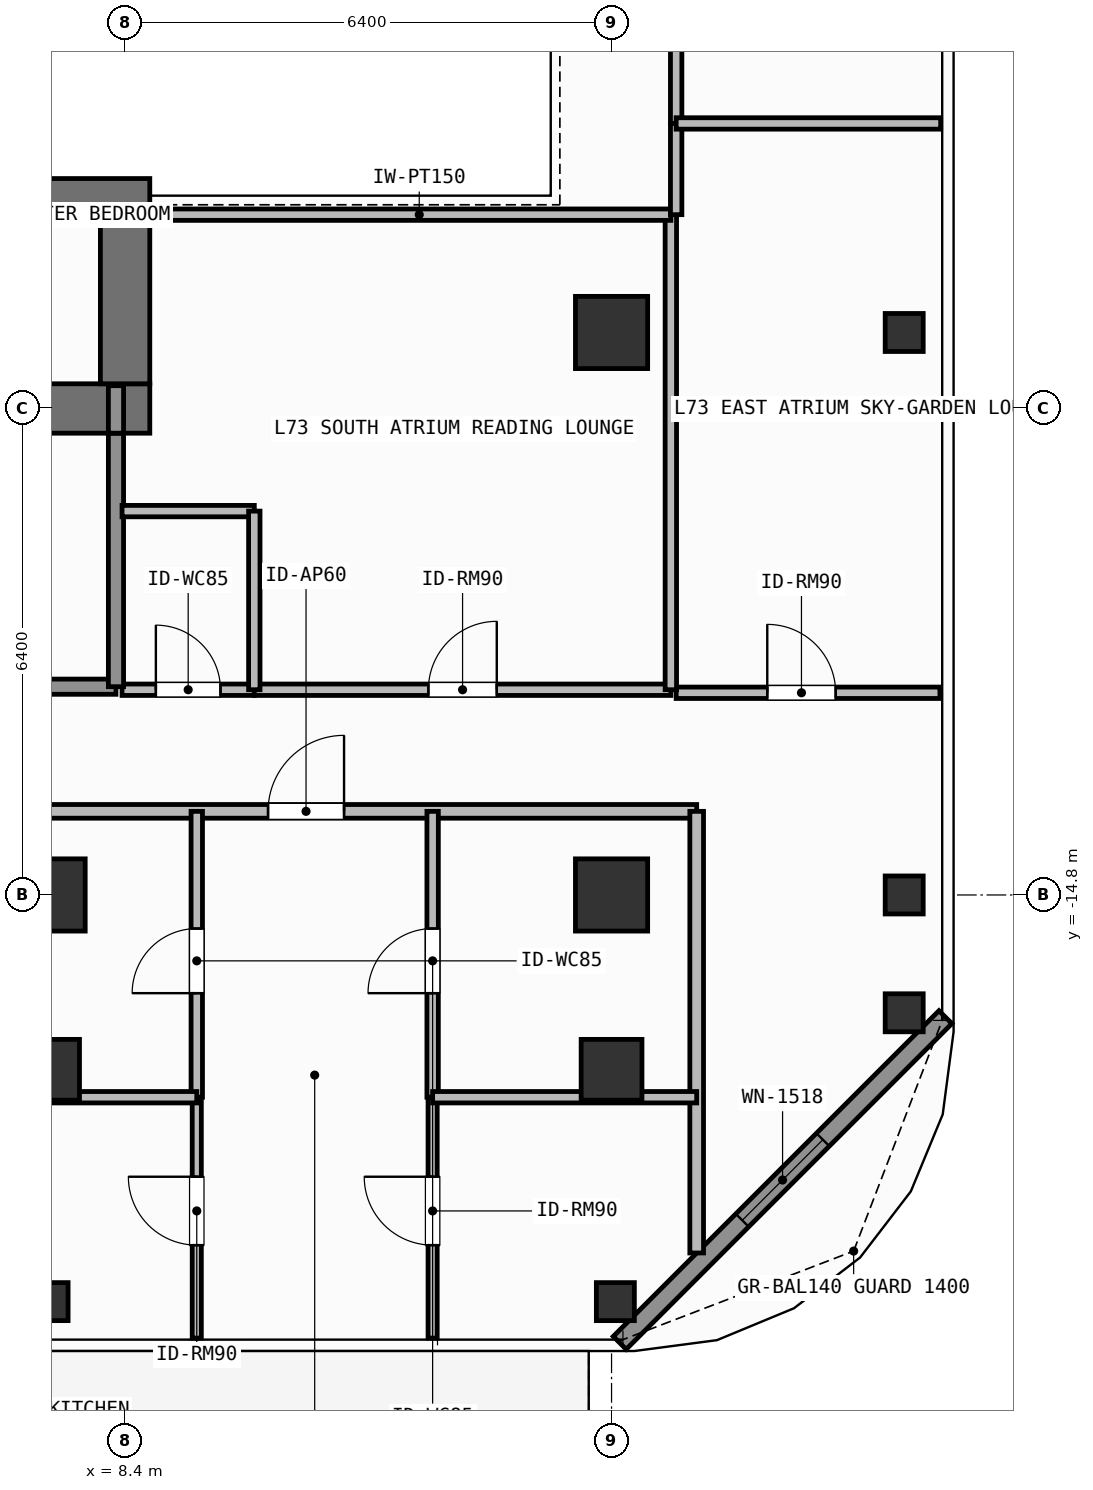
"""IFC4 building model, lengths in metres.
Left out: names, types, materials, properties, quantities, classifications, styles, units other than length and angle.
Written with IfcOpenShell. Run it as: python <this file> out.ifc"""

import sys

from ifc_helpers import new_model, si_unit, direction, frame, frame_2d, origin, origin_2d, place, context, subcontext, project, spatial, rectangle, hollow_rectangle, extrude, element, fill, save


model = new_model("IFC4")
c1 = context("Model", 3, precision=1e-05, world=origin(), true_north=direction((0.0, 1.0)))
c2 = subcontext(c1, "Body", "Model", "MODEL_VIEW")
j1 = project(units=[si_unit("LENGTHUNIT", "METRE"), si_unit("PLANEANGLEUNIT", "RADIAN")], contexts=[c1])
p1 = place(None, origin())
s1 = spatial("IfcSite", under=j1, at=p1, CompositionType="ELEMENT")
p2 = place(p1, origin())
s2 = spatial("IfcBuilding", under=s1, at=p2, CompositionType="ELEMENT")
p3 = place(p2, frame((0.0, 0.0, 297.6)))
s3 = spatial("IfcBuildingStorey", under=s2, at=p3, CompositionType="ELEMENT", Elevation=297.6)
p4 = place(p3, frame((6.12, -8.4, 0.0), z_axis=(0.0, 0.0, 1.0), x_axis=(1.0, 0.0, 0.0)))
e1 = element("IfcWall", 1, at=p4, inside=s3, PredefinedType="SHEAR", context=c2, shape_type="SweptSolid", body=[
    extrude(rectangle(XDim=2.605, YDim=0.65, at=frame_2d((1.302, 0.0))), origin(), (0.0, 0.0, 1.0), 3.9),
])
p5 = place(p3, frame((8.4, -8.075, 0.0), z_axis=(0.0, 0.0, 1.0), x_axis=(0.0, 1.0, 0.0)))
e2 = element("IfcWall", 2, at=p5, inside=s3, PredefinedType="SHEAR", context=c2, shape_type="SweptSolid", body=[
    extrude(rectangle(XDim=2.25, YDim=0.65, at=frame_2d((1.125, 0.0))), origin(), (0.0, 0.0, 1.0), 3.9),
])
p6 = place(p3, frame((3.045, -5.6, 0.0), z_axis=(0.0, 0.0, 1.0), x_axis=(1.0, 0.0, 0.0)))
e3 = element("IfcWall", 3, at=p6, inside=s3, PredefinedType="SHEAR", context=c2, shape_type="SweptSolid", body=[
    extrude(rectangle(XDim=5.68, YDim=0.45, at=frame_2d((2.84, 0.0))), origin(), (0.0, 0.0, 1.0), 3.9),
])
for number, where, z_axis, x_axis in (
    (4, (7.4, -14.8, 0.0), (0.0, 0.0, 1.0), (1.0, 0.0, 0.0)),
    (5, (14.8, -14.8, 0.0), (0.0, 0.0, 1.0), (1.0, 0.0, 0.0)),
    (6, (14.8, -7.4, 0.0), (0.0, 0.0, 1.0), (1.0, 0.0, 0.0)),
):
    element("IfcColumn", number, at=place(p3, frame(where, z_axis=z_axis, x_axis=x_axis)), inside=s3, PredefinedType="COLUMN", context=c2, shape_type="SweptSolid", body=[
        extrude(rectangle(XDim=0.95, YDim=0.95, at=origin_2d()), origin(), (0.0, 0.0, 1.0), 3.9),
    ])
for number, where, z_axis, x_axis in (
    (7, (7.4, -17.1, 0.0), (0.0, 0.0, 1.0), (1.0, 0.0, 0.0)),
    (8, (14.8, -17.1, 0.0), (0.0, 0.0, 1.0), (1.0, 0.0, 0.0)),
):
    element("IfcColumn", number, at=place(p3, frame(where, z_axis=z_axis, x_axis=x_axis)), inside=s3, PredefinedType="COLUMN", context=c2, shape_type="SweptSolid", body=[
        extrude(hollow_rectangle(XDim=0.8, YDim=0.8, WallThickness=0.036, at=origin_2d()), origin(), (0.0, 0.0, 1.0), 3.9),
    ])
for number, where, z_axis, x_axis in (
    (9, (14.85, -20.15, 0.0), (0.0, 0.0, 1.0), (1.0, 0.0, 0.0)),
    (10, (18.65, -16.35, 0.0), (0.0, 0.0, 1.0), (1.0, 0.0, 0.0)),
    (11, (7.4, -20.15, 0.0), (0.0, 0.0, 1.0), (1.0, 0.0, 0.0)),
    (12, (18.65, -14.8, 0.0), (0.0, 0.0, 1.0), (1.0, 0.0, 0.0)),
    (13, (18.65, -7.4, 0.0), (0.0, 0.0, 1.0), (1.0, 0.0, 0.0)),
):
    element("IfcColumn", number, at=place(p3, frame(where, z_axis=z_axis, x_axis=x_axis)), inside=s3, PredefinedType="COLUMN", context=c2, shape_type="SweptSolid", body=[
        extrude(hollow_rectangle(XDim=0.5, YDim=0.5, WallThickness=0.025, at=origin_2d()), origin(), (0.0, 0.0, 1.0), 3.9),
    ])
p7 = place(p3, frame((19.192, -16.408, 0.0), z_axis=(0.0, 0.0, 1.0), x_axis=(-0.707106781187, -0.707106781187, 0.0)))
e14 = element("IfcWall", 14, at=p7, inside=s3, PredefinedType="SOLIDWALL", context=c2, shape_type="SweptSolid", body=[
    extrude(rectangle(XDim=6.059, YDim=0.24, at=frame_2d((3.03, 0.0))), origin(), (0.0, 0.0, 1.0), 3.68),
])
p8 = place(p7, frame((2.28, 0.0, 0.8)))
e15 = element("IfcOpeningElement", 15, at=p8, cuts=e14, PredefinedType="OPENING", context=c2, shape_type="SweptSolid", body=[
    extrude(rectangle(XDim=1.5, YDim=1.85, at=frame_2d((0.75, 0.925))), frame((0.0, 0.13, 0.0), z_axis=(0.0, -1.0, 0.0), x_axis=(1.0, 0.0, 0.0)), (0.0, 0.0, 1.0), 0.26),
])
p9 = place(p3, frame((4.58, -12.06, 0.0), z_axis=(0.0, 0.0, 1.0), x_axis=(1.0, 0.0, 0.0)))
e16 = element("IfcWall", 16, at=p9, inside=s3, PredefinedType="SOLIDWALL", context=c2, shape_type="SweptSolid", body=[
    extrude(rectangle(XDim=3.7, YDim=0.2, at=frame_2d((1.85, 0.0))), origin(), (0.0, 0.0, 1.0), 3.68),
])
p10 = place(p9, frame((1.212, 0.0, 0.0)))
e17 = element("IfcOpeningElement", 17, at=p10, cuts=e16, PredefinedType="OPENING", context=c2, shape_type="SweptSolid", body=[
    extrude(rectangle(XDim=1.1, YDim=2.15, at=frame_2d((0.55, 1.075))), frame((0.0, 0.11, 0.0), z_axis=(0.0, -1.0, 0.0), x_axis=(1.0, 0.0, 0.0)), (0.0, 0.0, 1.0), 0.22),
])
p11 = place(p3, frame((8.36, -12.1, 0.0), z_axis=(0.0, 0.0, 1.0), x_axis=(1.0, 0.0, 0.0)))
e18 = element("IfcWall", 18, at=p11, inside=s3, PredefinedType="PARTITIONING", context=c2, shape_type="SweptSolid", body=[
    extrude(rectangle(XDim=1.74, YDim=0.15, at=frame_2d((0.87, 0.0))), origin(), (0.0, 0.0, 1.0), 3.68),
])
p12 = place(p11, frame((0.445, 0.0, 0.0)))
e19 = element("IfcOpeningElement", 19, at=p12, cuts=e18, PredefinedType="OPENING", context=c2, shape_type="SweptSolid", body=[
    extrude(rectangle(XDim=0.85, YDim=2.1, at=frame_2d((0.425, 1.05))), frame((0.0, 0.085, 0.0), z_axis=(0.0, -1.0, 0.0), x_axis=(1.0, 0.0, 0.0)), (0.0, 0.0, 1.0), 0.17),
])
p13 = place(p3, frame((10.1, -12.1, 0.0), z_axis=(0.0, 0.0, 1.0), x_axis=(1.0, 0.0, 0.0)))
e20 = element("IfcWall", 20, at=p13, inside=s3, PredefinedType="PARTITIONING", context=c2, shape_type="SweptSolid", body=[
    extrude(rectangle(XDim=5.48, YDim=0.15, at=frame_2d((2.74, 0.0))), origin(), (0.0, 0.0, 1.0), 3.68),
])
p14 = place(p13, frame((2.29, 0.0, 0.0)))
e21 = element("IfcOpeningElement", 21, at=p14, cuts=e20, PredefinedType="OPENING", context=c2, shape_type="SweptSolid", body=[
    extrude(rectangle(XDim=0.9, YDim=2.1, at=frame_2d((0.45, 1.05))), frame((0.0, 0.085, 0.0), z_axis=(0.0, -1.0, 0.0), x_axis=(1.0, 0.0, 0.0)), (0.0, 0.0, 1.0), 0.17),
])
p15 = place(p3, frame((5.283, -13.7, 0.0), z_axis=(0.0, 0.0, 1.0), x_axis=(1.0, 0.0, 0.0)))
e22 = element("IfcWall", 22, at=p15, inside=s3, PredefinedType="PARTITIONING", context=c2, shape_type="SweptSolid", body=[
    extrude(rectangle(XDim=10.637, YDim=0.18, at=frame_2d((5.318, 0.0))), origin(), (0.0, 0.0, 1.0), 3.68),
])
p16 = place(p15, frame((4.998, 0.0, 0.0)))
e23 = element("IfcOpeningElement", 23, at=p16, cuts=e22, PredefinedType="OPENING", context=c2, shape_type="SweptSolid", body=[
    extrude(rectangle(XDim=1.0, YDim=2.2, at=frame_2d((0.5, 1.1))), frame((0.0, 0.1, 0.0), z_axis=(0.0, -1.0, 0.0), x_axis=(1.0, 0.0, 0.0)), (0.0, 0.0, 1.0), 0.2),
])
p17 = place(p3, frame((9.343, -17.461, 0.0), z_axis=(0.0, 0.0, 1.0), x_axis=(0.0, 1.0, 0.0)))
e24 = element("IfcWall", 24, at=p17, inside=s3, PredefinedType="PARTITIONING", context=c2, shape_type="SweptSolid", body=[
    extrude(rectangle(XDim=3.761, YDim=0.15, at=frame_2d((1.88, 0.0))), origin(), (0.0, 0.0, 1.0), 3.68),
])
p18 = place(p17, frame((1.369, 0.0, 0.0)))
e25 = element("IfcOpeningElement", 25, at=p18, cuts=e24, PredefinedType="OPENING", context=c2, shape_type="SweptSolid", body=[
    extrude(rectangle(XDim=0.85, YDim=2.1, at=frame_2d((0.425, 1.05))), frame((0.0, 0.085, 0.0), z_axis=(0.0, -1.0, 0.0), x_axis=(1.0, 0.0, 0.0)), (0.0, 0.0, 1.0), 0.17),
])
p19 = place(p3, frame((9.343, -20.63, 0.0), z_axis=(0.0, 0.0, 1.0), x_axis=(0.0, 1.0, 0.0)))
e26 = element("IfcWall", 26, at=p19, inside=s3, PredefinedType="PARTITIONING", context=c2, shape_type="SweptSolid", body=[
    extrude(rectangle(XDim=3.169, YDim=0.12, at=frame_2d((1.584, 0.0))), origin(), (0.0, 0.0, 1.0), 3.68),
])
p20 = place(p19, frame((1.223, 0.0, 0.0)))
e27 = element("IfcOpeningElement", 27, at=p20, cuts=e26, PredefinedType="OPENING", context=c2, shape_type="SweptSolid", body=[
    extrude(rectangle(XDim=0.9, YDim=2.1, at=frame_2d((0.45, 1.05))), frame((0.0, 0.07, 0.0), z_axis=(0.0, -1.0, 0.0), x_axis=(1.0, 0.0, 0.0)), (0.0, 0.0, 1.0), 0.14),
])
p21 = place(p3, frame((12.446, -17.461, 0.0), z_axis=(0.0, 0.0, 1.0), x_axis=(0.0, 1.0, 0.0)))
e28 = element("IfcWall", 28, at=p21, inside=s3, PredefinedType="PARTITIONING", context=c2, shape_type="SweptSolid", body=[
    extrude(rectangle(XDim=3.761, YDim=0.15, at=frame_2d((1.88, 0.0))), origin(), (0.0, 0.0, 1.0), 3.68),
])
p22 = place(p21, frame((1.369, 0.0, 0.0)))
e29 = element("IfcOpeningElement", 29, at=p22, cuts=e28, PredefinedType="OPENING", context=c2, shape_type="SweptSolid", body=[
    extrude(rectangle(XDim=0.85, YDim=2.1, at=frame_2d((0.425, 1.05))), frame((0.0, 0.085, 0.0), z_axis=(0.0, -1.0, 0.0), x_axis=(1.0, 0.0, 0.0)), (0.0, 0.0, 1.0), 0.17),
])
p23 = place(p3, frame((12.446, -20.63, 0.0), z_axis=(0.0, 0.0, 1.0), x_axis=(0.0, 1.0, 0.0)))
e30 = element("IfcWall", 30, at=p23, inside=s3, PredefinedType="PARTITIONING", context=c2, shape_type="SweptSolid", body=[
    extrude(rectangle(XDim=3.169, YDim=0.12, at=frame_2d((1.584, 0.0))), origin(), (0.0, 0.0, 1.0), 3.68),
])
p24 = place(p23, frame((1.223, 0.0, 0.0)))
e31 = element("IfcOpeningElement", 31, at=p24, cuts=e30, PredefinedType="OPENING", context=c2, shape_type="SweptSolid", body=[
    extrude(rectangle(XDim=0.9, YDim=2.1, at=frame_2d((0.45, 1.05))), frame((0.0, 0.07, 0.0), z_axis=(0.0, -1.0, 0.0), x_axis=(1.0, 0.0, 0.0)), (0.0, 0.0, 1.0), 0.14),
])
p25 = place(p3, frame((15.65, -12.14, 0.0), z_axis=(0.0, 0.0, 1.0), x_axis=(1.0, 0.0, 0.0)))
e32 = element("IfcWall", 32, at=p25, inside=s3, PredefinedType="PARTITIONING", context=c2, shape_type="SweptSolid", body=[
    extrude(rectangle(XDim=3.47, YDim=0.15, at=frame_2d((1.735, 0.0))), origin(), (0.0, 0.0, 1.0), 3.68),
])
p26 = place(p25, frame((1.198, 0.0, 0.0)))
e33 = element("IfcOpeningElement", 33, at=p26, cuts=e32, PredefinedType="OPENING", context=c2, shape_type="SweptSolid", body=[
    extrude(rectangle(XDim=0.9, YDim=2.1, at=frame_2d((0.45, 1.05))), frame((0.0, 0.085, 0.0), z_axis=(0.0, -1.0, 0.0), x_axis=(1.0, 0.0, 0.0)), (0.0, 0.0, 1.0), 0.17),
])
p27 = place(p3, frame((8.28, -12.06, 0.0), z_axis=(0.0, 0.0, 1.0), x_axis=(0.0, 1.0, 0.0)))
e34 = element("IfcWall", 34, at=p27, inside=s3, PredefinedType="SOLIDWALL", context=c2, shape_type="SweptSolid", body=[
    extrude(rectangle(XDim=3.335, YDim=0.2, at=frame_2d((1.667, 0.0))), origin(), (0.0, 0.0, 1.0), 3.68),
])
p28 = place(p3, frame((8.28, -8.725, 0.0), z_axis=(0.0, 0.0, 1.0), x_axis=(0.0, 1.0, 0.0)))
e35 = element("IfcWall", 35, at=p28, inside=s3, PredefinedType="SOLIDWALL", context=c2, shape_type="SweptSolid", body=[
    extrude(rectangle(XDim=0.625, YDim=0.2, at=frame_2d((0.312, 0.0))), origin(), (0.0, 0.0, 1.0), 3.68),
])
p29 = place(p3, frame((8.36, -9.75, 0.0), z_axis=(0.0, 0.0, 1.0), x_axis=(1.0, 0.0, 0.0)))
e36 = element("IfcWall", 36, at=p29, inside=s3, PredefinedType="PARTITIONING", context=c2, shape_type="SweptSolid", body=[
    extrude(rectangle(XDim=1.74, YDim=0.15, at=frame_2d((0.87, 0.0))), origin(), (0.0, 0.0, 1.0), 3.68),
])
p30 = place(p3, frame((10.1, -12.1, 0.0), z_axis=(0.0, 0.0, 1.0), x_axis=(0.0, 1.0, 0.0)))
e37 = element("IfcWall", 37, at=p30, inside=s3, PredefinedType="PARTITIONING", context=c2, shape_type="SweptSolid", body=[
    extrude(rectangle(XDim=2.35, YDim=0.15, at=frame_2d((1.175, 0.0))), origin(), (0.0, 0.0, 1.0), 3.68),
])
p31 = place(p3, frame((15.58, -12.1, 0.0), z_axis=(0.0, 0.0, 1.0), x_axis=(0.0, 1.0, 0.0)))
e38 = element("IfcWall", 38, at=p31, inside=s3, PredefinedType="PARTITIONING", context=c2, shape_type="SweptSolid", body=[
    extrude(rectangle(XDim=6.25, YDim=0.15, at=frame_2d((3.125, 0.0))), origin(), (0.0, 0.0, 1.0), 3.68),
])
p32 = place(p3, frame((8.96, -5.85, 0.0), z_axis=(0.0, 0.0, 1.0), x_axis=(1.0, 0.0, 0.0)))
e39 = element("IfcWall", 39, at=p32, inside=s3, PredefinedType="PARTITIONING", context=c2, shape_type="SweptSolid", body=[
    extrude(rectangle(XDim=6.62, YDim=0.15, at=frame_2d((3.31, 0.0))), origin(), (0.0, 0.0, 1.0), 3.68),
])
p33 = place(p3, frame((15.92, -19.51, 0.0), z_axis=(0.0, 0.0, 1.0), x_axis=(0.0, 1.0, 0.0)))
e40 = element("IfcWall", 40, at=p33, inside=s3, PredefinedType="PARTITIONING", context=c2, shape_type="SweptSolid", body=[
    extrude(rectangle(XDim=5.81, YDim=0.18, at=frame_2d((2.905, 0.0))), origin(), (0.0, 0.0, 1.0), 3.68),
])
p34 = place(p3, frame((5.283, -17.461, 0.0), z_axis=(0.0, 0.0, 1.0), x_axis=(1.0, 0.0, 0.0)))
e41 = element("IfcWall", 41, at=p34, inside=s3, PredefinedType="PARTITIONING", context=c2, shape_type="SweptSolid", body=[
    extrude(rectangle(XDim=4.06, YDim=0.15, at=frame_2d((2.03, 0.0))), origin(), (0.0, 0.0, 1.0), 3.68),
])
p35 = place(p3, frame((12.446, -17.461, 0.0), z_axis=(0.0, 0.0, 1.0), x_axis=(1.0, 0.0, 0.0)))
e42 = element("IfcWall", 42, at=p35, inside=s3, PredefinedType="PARTITIONING", context=c2, shape_type="SweptSolid", body=[
    extrude(rectangle(XDim=3.474, YDim=0.15, at=frame_2d((1.737, 0.0))), origin(), (0.0, 0.0, 1.0), 3.68),
])
p36 = place(p3, frame((15.65, -5.85, 0.0), z_axis=(0.0, 0.0, 1.0), x_axis=(0.0, 1.0, 0.0)))
e43 = element("IfcWall", 43, at=p36, inside=s3, PredefinedType="PARTITIONING", context=c2, shape_type="SweptSolid", body=[
    extrude(rectangle(XDim=1.2, YDim=0.15, at=frame_2d((0.6, 0.0))), origin(), (0.0, 0.0, 1.0), 3.68),
])
p37 = place(p3, frame((15.65, -4.65, 0.0), z_axis=(0.0, 0.0, 1.0), x_axis=(0.0, 1.0, 0.0)))
e44 = element("IfcWall", 44, at=p37, inside=s3, PredefinedType="PARTITIONING", context=c2, shape_type="SweptSolid", body=[
    extrude(rectangle(XDim=10.5, YDim=0.15, at=frame_2d((5.25, 0.0))), origin(), (0.0, 0.0, 1.0), 3.68),
])
p38 = place(p3, frame((15.65, -4.65, 0.0), z_axis=(0.0, 0.0, 1.0), x_axis=(1.0, 0.0, 0.0)))
e45 = element("IfcWall", 45, at=p38, inside=s3, PredefinedType="PARTITIONING", context=c2, shape_type="SweptSolid", body=[
    extrude(rectangle(XDim=3.48, YDim=0.15, at=frame_2d((1.74, 0.0))), origin(), (0.0, 0.0, 1.0), 3.68),
])
p39 = place(p8, origin())
e46 = element("IfcWindow", 46, at=p39, inside=s3, PartitioningType="SINGLE_PANEL", PredefinedType="WINDOW", context=c2, shape_type="SweptSolid", body=[
    extrude(rectangle(XDim=1.5, YDim=1.85, at=frame_2d((0.75, 0.925))), frame((0.0, 0.03, 0.0), z_axis=(0.0, -1.0, 0.0), x_axis=(1.0, 0.0, 0.0)), (0.0, 0.0, 1.0), 0.06),
])
fill(e15, e46)
p40 = place(p12, origin())
e47 = element("IfcDoor", 47, at=p40, inside=s3, OperationType="SINGLE_SWING_LEFT", PredefinedType="DOOR", context=c2, shape_type="SweptSolid", body=[
    extrude(rectangle(XDim=0.85, YDim=2.1, at=frame_2d((0.425, 1.05))), frame((0.0, 0.025, 0.0), z_axis=(0.0, -1.0, 0.0), x_axis=(1.0, 0.0, 0.0)), (0.0, 0.0, 1.0), 0.05),
])
fill(e19, e47)
p41 = place(p14, origin())
e48 = element("IfcDoor", 48, at=p41, inside=s3, OperationType="SINGLE_SWING_RIGHT", PredefinedType="DOOR", context=c2, shape_type="SweptSolid", body=[
    extrude(rectangle(XDim=0.9, YDim=2.1, at=frame_2d((0.45, 1.05))), frame((0.0, 0.025, 0.0), z_axis=(0.0, -1.0, 0.0), x_axis=(1.0, 0.0, 0.0)), (0.0, 0.0, 1.0), 0.05),
])
fill(e21, e48)
p42 = place(p16, origin())
e49 = element("IfcDoor", 49, at=p42, inside=s3, OperationType="SINGLE_SWING_RIGHT", PredefinedType="DOOR", context=c2, shape_type="SweptSolid", body=[
    extrude(rectangle(XDim=1.0, YDim=2.2, at=frame_2d((0.5, 1.1))), frame((0.0, 0.025, 0.0), z_axis=(0.0, -1.0, 0.0), x_axis=(1.0, 0.0, 0.0)), (0.0, 0.0, 1.0), 0.05),
])
fill(e23, e49)
p43 = place(p18, origin())
e50 = element("IfcDoor", 50, at=p43, inside=s3, OperationType="SINGLE_SWING_LEFT", PredefinedType="DOOR", context=c2, shape_type="SweptSolid", body=[
    extrude(rectangle(XDim=0.85, YDim=2.1, at=frame_2d((0.425, 1.05))), frame((0.0, 0.025, 0.0), z_axis=(0.0, -1.0, 0.0), x_axis=(1.0, 0.0, 0.0)), (0.0, 0.0, 1.0), 0.05),
])
fill(e25, e50)
p44 = place(p20, origin())
e51 = element("IfcDoor", 51, at=p44, inside=s3, OperationType="SINGLE_SWING_RIGHT", PredefinedType="DOOR", context=c2, shape_type="SweptSolid", body=[
    extrude(rectangle(XDim=0.9, YDim=2.1, at=frame_2d((0.45, 1.05))), frame((0.0, 0.025, 0.0), z_axis=(0.0, -1.0, 0.0), x_axis=(1.0, 0.0, 0.0)), (0.0, 0.0, 1.0), 0.05),
])
fill(e27, e51)
p45 = place(p22, origin())
e52 = element("IfcDoor", 52, at=p45, inside=s3, OperationType="SINGLE_SWING_LEFT", PredefinedType="DOOR", context=c2, shape_type="SweptSolid", body=[
    extrude(rectangle(XDim=0.85, YDim=2.1, at=frame_2d((0.425, 1.05))), frame((0.0, 0.025, 0.0), z_axis=(0.0, -1.0, 0.0), x_axis=(1.0, 0.0, 0.0)), (0.0, 0.0, 1.0), 0.05),
])
fill(e29, e52)
p46 = place(p24, origin())
e53 = element("IfcDoor", 53, at=p46, inside=s3, OperationType="SINGLE_SWING_RIGHT", PredefinedType="DOOR", context=c2, shape_type="SweptSolid", body=[
    extrude(rectangle(XDim=0.9, YDim=2.1, at=frame_2d((0.45, 1.05))), frame((0.0, 0.025, 0.0), z_axis=(0.0, -1.0, 0.0), x_axis=(1.0, 0.0, 0.0)), (0.0, 0.0, 1.0), 0.05),
])
fill(e31, e53)
p47 = place(p26, origin())
e54 = element("IfcDoor", 54, at=p47, inside=s3, OperationType="SINGLE_SWING_LEFT", PredefinedType="DOOR", context=c2, shape_type="SweptSolid", body=[
    extrude(rectangle(XDim=0.9, YDim=2.1, at=frame_2d((0.45, 1.05))), frame((0.0, 0.025, 0.0), z_axis=(0.0, -1.0, 0.0), x_axis=(1.0, 0.0, 0.0)), (0.0, 0.0, 1.0), 0.05),
])
fill(e33, e54)
save(model, sys.argv[1])
